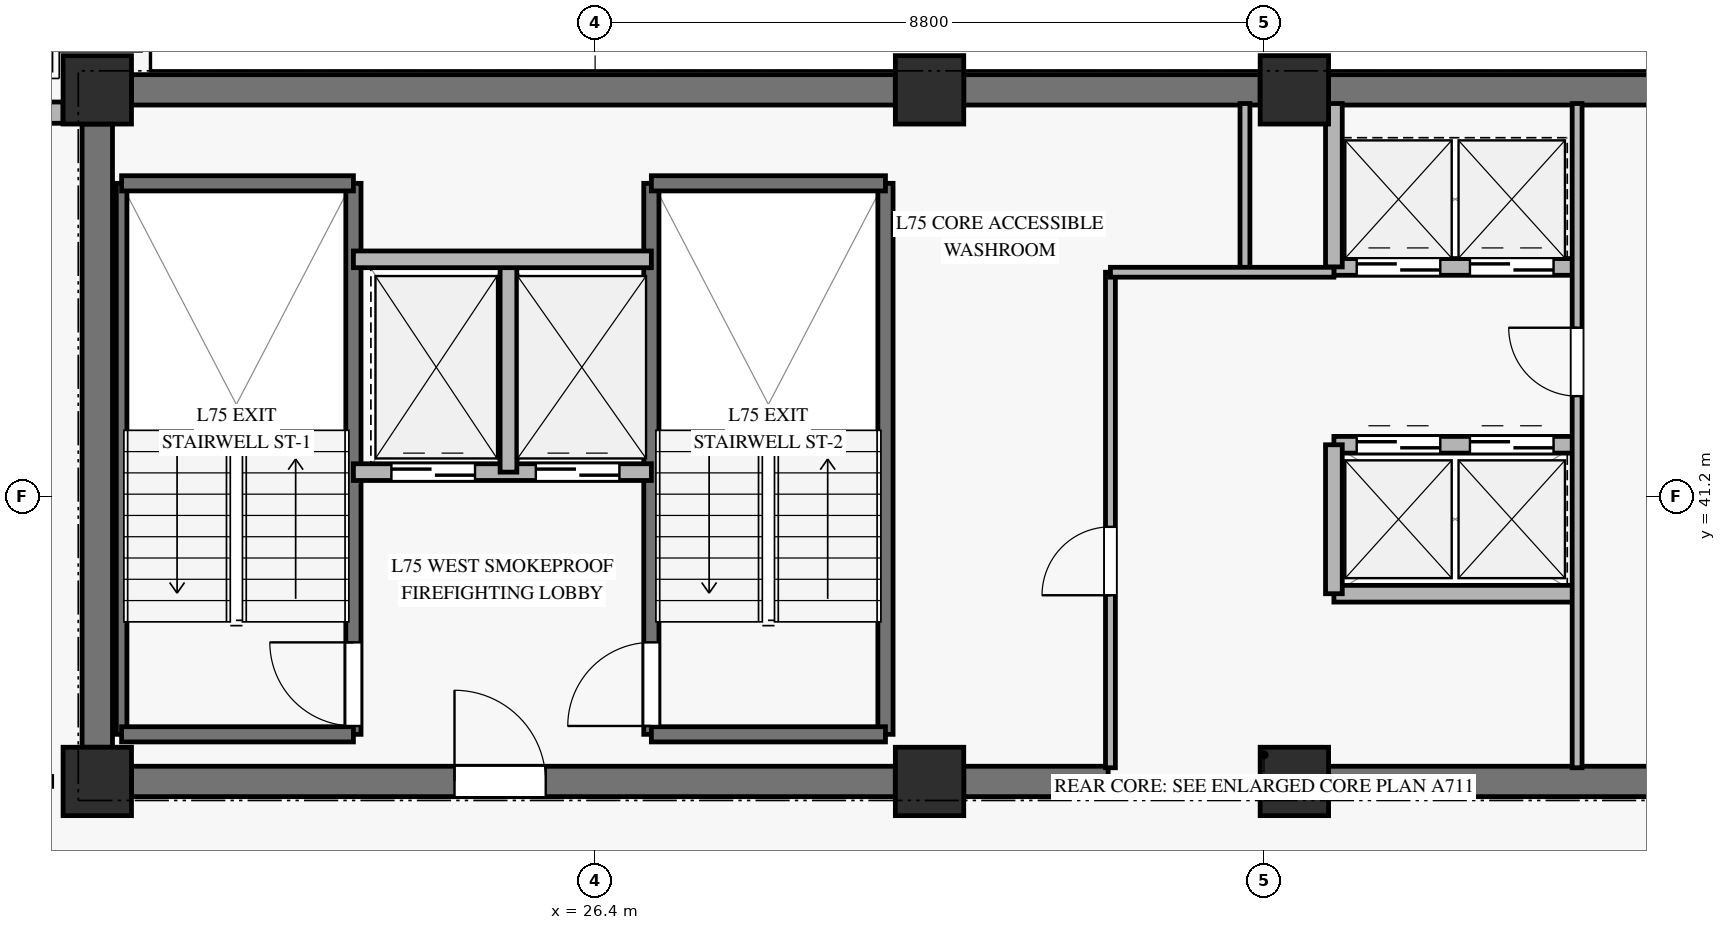
"""IFC4 building model, lengths in metres.
Left out: names, types, materials, properties, quantities, classifications, styles, units other than length and angle.
Written with IfcOpenShell. Run it as: python <this file> out.ifc"""

import sys

from ifc_helpers import new_model, si_unit, direction, frame, frame_2d, origin, origin_2d, place, context, subcontext, project, spatial, rectangle, extrude, source, transform, mapped, element, fill, save


model = new_model("IFC4")
c1 = context("Model", 3, precision=1e-05, world=origin(), true_north=direction((0.0, 1.0)))
c2 = subcontext(c1, "Body", "Model", "MODEL_VIEW")
j1 = project(units=[si_unit("LENGTHUNIT", "METRE"), si_unit("PLANEANGLEUNIT", "RADIAN")], contexts=[c1])
p1 = place(None, origin())
s1 = spatial("IfcSite", under=j1, at=p1, CompositionType="ELEMENT")
p2 = place(p1, origin())
s2 = spatial("IfcBuilding", under=s1, at=p2, CompositionType="ELEMENT")
p3 = place(p2, frame((0.0, 0.0, 293.8)))
s3 = spatial("IfcBuildingStorey", under=s2, at=p3, CompositionType="ELEMENT", Elevation=293.8)
m1 = source(origin(), c2, "Body", "SweptSolid", [
    extrude(rectangle(XDim=0.9, YDim=0.9, at=origin_2d()), origin(), (0.0, 0.0, 1.0), 3.185),
])
for number, where, z_axis, x_axis in (
    (1, (19.85, 37.45, 0.0), (0.0, 0.0, 1.0), (1.0, 0.0, 0.0)),
    (2, (19.85, 46.55, 0.0), (0.0, 0.0, 1.0), (1.0, 0.0, 0.0)),
    (3, (30.8, 37.45, 0.0), (0.0, 0.0, 1.0), (1.0, 0.0, 0.0)),
    (4, (30.8, 46.55, 0.0), (0.0, 0.0, 1.0), (1.0, 0.0, 0.0)),
    (5, (35.6, 37.45, 0.0), (0.0, 0.0, 1.0), (1.0, 0.0, 0.0)),
    (6, (35.6, 46.55, 0.0), (0.0, 0.0, 1.0), (1.0, 0.0, 0.0)),
):
    element("IfcColumn", number, at=place(p3, frame(where, z_axis=z_axis, x_axis=x_axis)), inside=s3, PredefinedType="PILASTER", context=c2, shape_type="MappedRepresentation", body=[
        mapped(m1, transform((0.0, 0.0, 0.0), x_axis=(1.0, 0.0, 0.0), y_axis=(0.0, 1.0, 0.0), z_axis=(0.0, 0.0, 1.0), scale=1.0)),
    ])
p4 = place(p3, frame((20.3, 46.55, 0.0), z_axis=(0.0, 0.0, 1.0), x_axis=(1.0, 0.0, 0.0)))
e7 = element("IfcWall", 7, at=p4, inside=s3, PredefinedType="SHEAR", context=c2, shape_type="SweptSolid", body=[
    extrude(rectangle(XDim=10.05, YDim=0.4, at=frame_2d((5.025, 0.0))), origin(), (0.0, 0.0, 1.0), 3.185),
])
p5 = place(p3, frame((31.25, 46.55, 0.0), z_axis=(0.0, 0.0, 1.0), x_axis=(1.0, 0.0, 0.0)))
e8 = element("IfcWall", 8, at=p5, inside=s3, PredefinedType="SHEAR", context=c2, shape_type="SweptSolid", body=[
    extrude(rectangle(XDim=3.9, YDim=0.4, at=frame_2d((1.95, 0.0))), origin(), (0.0, 0.0, 1.0), 3.185),
])
p6 = place(p3, frame((36.05, 46.55, 0.0), z_axis=(0.0, 0.0, 1.0), x_axis=(1.0, 0.0, 0.0)))
e9 = element("IfcWall", 9, at=p6, inside=s3, PredefinedType="SHEAR", context=c2, shape_type="SweptSolid", body=[
    extrude(rectangle(XDim=7.8, YDim=0.4, at=frame_2d((3.9, 0.0))), origin(), (0.0, 0.0, 1.0), 3.185),
])
p7 = place(p3, frame((20.3, 37.45, 0.0), z_axis=(0.0, 0.0, 1.0), x_axis=(1.0, 0.0, 0.0)))
e10 = element("IfcWall", 10, at=p7, inside=s3, PredefinedType="SHEAR", context=c2, shape_type="SweptSolid", body=[
    extrude(rectangle(XDim=10.05, YDim=0.4, at=frame_2d((5.025, 0.0))), origin(), (0.0, 0.0, 1.0), 3.185),
])
p8 = place(p7, frame((4.25, 0.0, 0.0)))
e11 = element("IfcOpeningElement", 11, at=p8, cuts=e10, PredefinedType="OPENING", context=c2, shape_type="SweptSolid", body=[
    extrude(rectangle(XDim=1.2, YDim=2.15, at=frame_2d((0.6, 1.075))), frame((0.0, 0.21, 0.0), z_axis=(0.0, -1.0, 0.0), x_axis=(1.0, 0.0, 0.0)), (0.0, 0.0, 1.0), 0.42),
])
p9 = place(p3, frame((31.25, 37.45, 0.0), z_axis=(0.0, 0.0, 1.0), x_axis=(1.0, 0.0, 0.0)))
e12 = element("IfcWall", 12, at=p9, inside=s3, PredefinedType="SHEAR", context=c2, shape_type="SweptSolid", body=[
    extrude(rectangle(XDim=1.9, YDim=0.4, at=frame_2d((0.95, 0.0))), origin(), (0.0, 0.0, 1.0), 3.185),
])
p10 = place(p3, frame((36.05, 37.45, 0.0), z_axis=(0.0, 0.0, 1.0), x_axis=(1.0, 0.0, 0.0)))
e13 = element("IfcWall", 13, at=p10, inside=s3, PredefinedType="SHEAR", context=c2, shape_type="SweptSolid", body=[
    extrude(rectangle(XDim=7.8, YDim=0.4, at=frame_2d((3.9, 0.0))), origin(), (0.0, 0.0, 1.0), 3.185),
])
p11 = place(p3, frame((19.85, 37.9, 0.0), z_axis=(0.0, 0.0, 1.0), x_axis=(0.0, 1.0, 0.0)))
e14 = element("IfcWall", 14, at=p11, inside=s3, PredefinedType="SHEAR", context=c2, shape_type="SweptSolid", body=[
    extrude(rectangle(XDim=8.2, YDim=0.4, at=frame_2d((4.1, 0.0))), origin(), (0.0, 0.0, 1.0), 3.185),
])
p12 = place(p3, frame((12.68, 46.25, 0.0), z_axis=(0.0, 0.0, 1.0), x_axis=(1.0, 0.0, 0.0)))
e15 = element("IfcWall", 15, at=p12, inside=s3, PredefinedType="SOLIDWALL", context=c2, shape_type="SweptSolid", body=[
    extrude(rectangle(XDim=6.72, YDim=0.28, at=frame_2d((3.36, 0.0))), origin(), (0.0, 0.0, 1.0), 2.815),
])
p13 = place(p12, frame((2.56, 0.0, 0.45)))
e16 = element("IfcOpeningElement", 16, at=p13, cuts=e15, PredefinedType="OPENING", context=c2, shape_type="SweptSolid", body=[
    extrude(rectangle(XDim=1.6, YDim=2.0, at=frame_2d((0.8, 1.0))), frame((0.0, 0.15, 0.0), z_axis=(0.0, -1.0, 0.0), x_axis=(1.0, 0.0, 0.0)), (0.0, 0.0, 1.0), 0.3),
])
p14 = place(p3, frame((20.17, 38.07, 0.0), z_axis=(0.0, 0.0, 1.0), x_axis=(0.0, 1.0, 0.0)))
e17 = element("IfcWall", 17, at=p14, inside=s3, PredefinedType="SOLIDWALL", context=c2, shape_type="SweptSolid", body=[
    extrude(rectangle(XDim=7.25, YDim=0.14, at=frame_2d((3.625, 0.0))), origin(), (0.0, 0.0, 1.0), 3.4),
])
p15 = place(p3, frame((23.22, 38.07, 0.0), z_axis=(0.0, 0.0, 1.0), x_axis=(0.0, 1.0, 0.0)))
e18 = element("IfcWall", 18, at=p15, inside=s3, PredefinedType="SOLIDWALL", context=c2, shape_type="SweptSolid", body=[
    extrude(rectangle(XDim=7.25, YDim=0.2, at=frame_2d((3.625, 0.0))), origin(), (0.0, 0.0, 1.0), 3.4),
])
p16 = place(p15, frame((0.11, 0.0, 0.0)))
e19 = element("IfcOpeningElement", 19, at=p16, cuts=e18, PredefinedType="OPENING", context=c2, shape_type="SweptSolid", body=[
    extrude(rectangle(XDim=1.1, YDim=2.15, at=frame_2d((0.55, 1.075))), frame((0.0, 0.11, 0.0), z_axis=(0.0, -1.0, 0.0), x_axis=(1.0, 0.0, 0.0)), (0.0, 0.0, 1.0), 0.22),
])
for number, where, z_axis, x_axis in (
    (20, (20.17, 45.32, 0.0), (0.0, 0.0, 1.0), (1.0, 0.0, 0.0)),
    (21, (20.17, 38.07, 0.0), (0.0, 0.0, 1.0), (1.0, 0.0, 0.0)),
):
    element("IfcWall", number, at=place(p3, frame(where, z_axis=z_axis, x_axis=x_axis)), inside=s3, PredefinedType="SOLIDWALL", context=c2, shape_type="SweptSolid", body=[
        extrude(rectangle(XDim=3.05, YDim=0.2, at=frame_2d((1.525, 0.0))), origin(), (0.0, 0.0, 1.0), 3.4),
    ])
p17 = place(p3, frame((27.14, 38.07, 0.0), z_axis=(0.0, 0.0, 1.0), x_axis=(0.0, 1.0, 0.0)))
e22 = element("IfcWall", 22, at=p17, inside=s3, PredefinedType="SOLIDWALL", context=c2, shape_type="SweptSolid", body=[
    extrude(rectangle(XDim=7.25, YDim=0.2, at=frame_2d((3.625, 0.0))), origin(), (0.0, 0.0, 1.0), 3.4),
])
p18 = place(p17, frame((0.11, 0.0, 0.0)))
e23 = element("IfcOpeningElement", 23, at=p18, cuts=e22, PredefinedType="OPENING", context=c2, shape_type="SweptSolid", body=[
    extrude(rectangle(XDim=1.1, YDim=2.15, at=frame_2d((0.55, 1.075))), frame((0.0, 0.11, 0.0), z_axis=(0.0, -1.0, 0.0), x_axis=(1.0, 0.0, 0.0)), (0.0, 0.0, 1.0), 0.22),
])
p19 = place(p3, frame((30.22, 38.07, 0.0), z_axis=(0.0, 0.0, 1.0), x_axis=(0.0, 1.0, 0.0)))
e24 = element("IfcWall", 24, at=p19, inside=s3, PredefinedType="SOLIDWALL", context=c2, shape_type="SweptSolid", body=[
    extrude(rectangle(XDim=7.25, YDim=0.2, at=frame_2d((3.625, 0.0))), origin(), (0.0, 0.0, 1.0), 3.4),
])
for number, where, z_axis, x_axis in (
    (25, (27.14, 45.32, 0.0), (0.0, 0.0, 1.0), (1.0, 0.0, 0.0)),
    (26, (27.14, 38.07, 0.0), (0.0, 0.0, 1.0), (1.0, 0.0, 0.0)),
):
    element("IfcWall", number, at=place(p3, frame(where, z_axis=z_axis, x_axis=x_axis)), inside=s3, PredefinedType="SOLIDWALL", context=c2, shape_type="SweptSolid", body=[
        extrude(rectangle(XDim=3.08, YDim=0.2, at=frame_2d((1.54, 0.0))), origin(), (0.0, 0.0, 1.0), 3.4),
    ])
p20 = place(p3, frame((23.22, 41.52, 0.0), z_axis=(0.0, 0.0, 1.0), x_axis=(1.0, 0.0, 0.0)))
e27 = element("IfcWall", 27, at=p20, inside=s3, PredefinedType="SOLIDWALL", context=c2, shape_type="SweptSolid", body=[
    extrude(rectangle(XDim=3.92, YDim=0.22, at=frame_2d((1.96, 0.0))), origin(), (0.0, 0.0, 1.0), 3.185),
])
p21 = place(p20, frame((0.5, 0.0, 0.0)))
e28 = element("IfcOpeningElement", 28, at=p21, cuts=e27, PredefinedType="OPENING", context=c2, shape_type="SweptSolid", body=[
    extrude(rectangle(XDim=1.1, YDim=2.2, at=frame_2d((0.55, 1.1))), frame((0.0, 0.12, 0.0), z_axis=(0.0, -1.0, 0.0), x_axis=(1.0, 0.0, 0.0)), (0.0, 0.0, 1.0), 0.24),
])
p22 = place(p20, frame((2.4, 0.0, 0.0)))
e29 = element("IfcOpeningElement", 29, at=p22, cuts=e27, PredefinedType="OPENING", context=c2, shape_type="SweptSolid", body=[
    extrude(rectangle(XDim=1.1, YDim=2.2, at=frame_2d((0.55, 1.1))), frame((0.0, 0.12, 0.0), z_axis=(0.0, -1.0, 0.0), x_axis=(1.0, 0.0, 0.0)), (0.0, 0.0, 1.0), 0.24),
])
p23 = place(p3, frame((25.26, 41.52, 0.0), z_axis=(0.0, 0.0, 1.0), x_axis=(0.0, 1.0, 0.0)))
e30 = element("IfcWall", 30, at=p23, inside=s3, PredefinedType="SOLIDWALL", context=c2, shape_type="SweptSolid", body=[
    extrude(rectangle(XDim=2.8, YDim=0.22, at=frame_2d((1.4, 0.0))), origin(), (0.0, 0.0, 1.0), 3.185),
])
p24 = place(p3, frame((23.22, 44.32, 0.0), z_axis=(0.0, 0.0, 1.0), x_axis=(1.0, 0.0, 0.0)))
e31 = element("IfcWall", 31, at=p24, inside=s3, PredefinedType="SOLIDWALL", context=c2, shape_type="SweptSolid", body=[
    extrude(rectangle(XDim=3.92, YDim=0.22, at=frame_2d((1.96, 0.0))), origin(), (0.0, 0.0, 1.0), 3.185),
])
p25 = place(p3, frame((36.12, 44.22, 0.0), z_axis=(0.0, 0.0, 1.0), x_axis=(1.0, 0.0, 0.0)))
e32 = element("IfcWall", 32, at=p25, inside=s3, PredefinedType="SOLIDWALL", context=c2, shape_type="SweptSolid", body=[
    extrude(rectangle(XDim=3.2, YDim=0.22, at=frame_2d((1.6, 0.0))), origin(), (0.0, 0.0, 1.0), 3.185),
])
p26 = place(p25, frame((0.3, 0.0, 0.0)))
e33 = element("IfcOpeningElement", 33, at=p26, cuts=e32, PredefinedType="OPENING", context=c2, shape_type="SweptSolid", body=[
    extrude(rectangle(XDim=1.1, YDim=2.2, at=frame_2d((0.55, 1.1))), frame((0.0, 0.12, 0.0), z_axis=(0.0, -1.0, 0.0), x_axis=(1.0, 0.0, 0.0)), (0.0, 0.0, 1.0), 0.24),
])
p27 = place(p25, frame((1.79, 0.0, 0.0)))
e34 = element("IfcOpeningElement", 34, at=p27, cuts=e32, PredefinedType="OPENING", context=c2, shape_type="SweptSolid", body=[
    extrude(rectangle(XDim=1.1, YDim=2.2, at=frame_2d((0.55, 1.1))), frame((0.0, 0.12, 0.0), z_axis=(0.0, -1.0, 0.0), x_axis=(1.0, 0.0, 0.0)), (0.0, 0.0, 1.0), 0.24),
])
p28 = place(p3, frame((36.12, 41.88, 0.0), z_axis=(0.0, 0.0, 1.0), x_axis=(1.0, 0.0, 0.0)))
e35 = element("IfcWall", 35, at=p28, inside=s3, PredefinedType="SOLIDWALL", context=c2, shape_type="SweptSolid", body=[
    extrude(rectangle(XDim=3.2, YDim=0.22, at=frame_2d((1.6, 0.0))), origin(), (0.0, 0.0, 1.0), 3.185),
])
p29 = place(p28, frame((0.3, 0.0, 0.0)))
e36 = element("IfcOpeningElement", 36, at=p29, cuts=e35, PredefinedType="OPENING", context=c2, shape_type="SweptSolid", body=[
    extrude(rectangle(XDim=1.1, YDim=2.2, at=frame_2d((0.55, 1.1))), frame((0.0, 0.12, 0.0), z_axis=(0.0, -1.0, 0.0), x_axis=(1.0, 0.0, 0.0)), (0.0, 0.0, 1.0), 0.24),
])
p30 = place(p28, frame((1.79, 0.0, 0.0)))
e37 = element("IfcOpeningElement", 37, at=p30, cuts=e35, PredefinedType="OPENING", context=c2, shape_type="SweptSolid", body=[
    extrude(rectangle(XDim=1.1, YDim=2.2, at=frame_2d((0.55, 1.1))), frame((0.0, 0.12, 0.0), z_axis=(0.0, -1.0, 0.0), x_axis=(1.0, 0.0, 0.0)), (0.0, 0.0, 1.0), 0.24),
])
p31 = place(p3, frame((36.12, 39.92, 0.0), z_axis=(0.0, 0.0, 1.0), x_axis=(1.0, 0.0, 0.0)))
e38 = element("IfcWall", 38, at=p31, inside=s3, PredefinedType="SOLIDWALL", context=c2, shape_type="SweptSolid", body=[
    extrude(rectangle(XDim=3.2, YDim=0.22, at=frame_2d((1.6, 0.0))), origin(), (0.0, 0.0, 1.0), 3.185),
])
p32 = place(p3, frame((36.12, 39.92, 0.0), z_axis=(0.0, 0.0, 1.0), x_axis=(0.0, 1.0, 0.0)))
e39 = element("IfcWall", 39, at=p32, inside=s3, PredefinedType="SOLIDWALL", context=c2, shape_type="SweptSolid", body=[
    extrude(rectangle(XDim=1.96, YDim=0.22, at=frame_2d((0.98, 0.0))), origin(), (0.0, 0.0, 1.0), 3.185),
])
p33 = place(p3, frame((36.12, 44.22, 0.0), z_axis=(0.0, 0.0, 1.0), x_axis=(0.0, 1.0, 0.0)))
e40 = element("IfcWall", 40, at=p33, inside=s3, PredefinedType="SOLIDWALL", context=c2, shape_type="SweptSolid", body=[
    extrude(rectangle(XDim=2.15, YDim=0.22, at=frame_2d((1.075, 0.0))), origin(), (0.0, 0.0, 1.0), 3.185),
])
p34 = place(p3, frame((33.18, 37.63, 0.0), z_axis=(0.0, 0.0, 1.0), x_axis=(0.0, 1.0, 0.0)))
e41 = element("IfcWall", 41, at=p34, inside=s3, PredefinedType="PARTITIONING", context=c2, shape_type="SweptSolid", body=[
    extrude(rectangle(XDim=6.52, YDim=0.13, at=frame_2d((3.26, 0.0))), origin(), (0.0, 0.0, 1.0), 2.27),
])
p35 = place(p34, frame((2.27, 0.0, 0.0)))
e42 = element("IfcOpeningElement", 42, at=p35, cuts=e41, PredefinedType="OPENING", context=c2, shape_type="SweptSolid", body=[
    extrude(rectangle(XDim=0.9, YDim=2.1, at=frame_2d((0.45, 1.05))), frame((0.0, 0.075, 0.0), z_axis=(0.0, -1.0, 0.0), x_axis=(1.0, 0.0, 0.0)), (0.0, 0.0, 1.0), 0.15),
])
p36 = place(p3, frame((34.95, 44.15, 0.0), z_axis=(0.0, 0.0, 1.0), x_axis=(0.0, 1.0, 0.0)))
e43 = element("IfcWall", 43, at=p36, inside=s3, PredefinedType="PARTITIONING", context=c2, shape_type="SweptSolid", body=[
    extrude(rectangle(XDim=2.22, YDim=0.13, at=frame_2d((1.11, 0.0))), origin(), (0.0, 0.0, 1.0), 3.185),
])
p37 = place(p3, frame((33.18, 44.15, 0.0), z_axis=(0.0, 0.0, 1.0), x_axis=(1.0, 0.0, 0.0)))
e44 = element("IfcWall", 44, at=p37, inside=s3, PredefinedType="PARTITIONING", context=c2, shape_type="SweptSolid", body=[
    extrude(rectangle(XDim=2.94, YDim=0.13, at=frame_2d((1.47, 0.0))), origin(), (0.0, 0.0, 1.0), 2.47),
])
p38 = place(p3, frame((39.32, 37.63, 0.0), z_axis=(0.0, 0.0, 1.0), x_axis=(0.0, 1.0, 0.0)))
e45 = element("IfcWall", 45, at=p38, inside=s3, PredefinedType="PARTITIONING", context=c2, shape_type="SweptSolid", body=[
    extrude(rectangle(XDim=8.74, YDim=0.13, at=frame_2d((4.37, 0.0))), origin(), (0.0, 0.0, 1.0), 3.185),
])
p39 = place(p38, frame((4.89, 0.0, 0.0)))
e46 = element("IfcOpeningElement", 46, at=p39, cuts=e45, PredefinedType="OPENING", context=c2, shape_type="SweptSolid", body=[
    extrude(rectangle(XDim=0.9, YDim=2.1, at=frame_2d((0.45, 1.05))), frame((0.0, 0.075, 0.0), z_axis=(0.0, -1.0, 0.0), x_axis=(1.0, 0.0, 0.0)), (0.0, 0.0, 1.0), 0.15),
])
m2 = source(origin(), c2, "Body", "SweptSolid", [
    extrude(rectangle(XDim=1.1, YDim=2.15, at=frame_2d((0.55, 1.075))), frame((0.0, 0.025, 0.0), z_axis=(0.0, -1.0, 0.0), x_axis=(1.0, 0.0, 0.0)), (0.0, 0.0, 1.0), 0.05),
])
p40 = place(p16, origin())
e47 = element("IfcDoor", 47, at=p40, inside=s3, OperationType="SINGLE_SWING_RIGHT", PredefinedType="DOOR", context=c2, shape_type="MappedRepresentation", body=[
    mapped(m2, transform((0.0, 0.0, 0.0), x_axis=(1.0, 0.0, 0.0), y_axis=(0.0, 1.0, 0.0), z_axis=(0.0, 0.0, 1.0), scale=1.0)),
])
fill(e19, e47)
p41 = place(p18, origin())
e48 = element("IfcDoor", 48, at=p41, inside=s3, OperationType="SINGLE_SWING_LEFT", PredefinedType="DOOR", context=c2, shape_type="MappedRepresentation", body=[
    mapped(m2, transform((0.0, 0.0, 0.0), x_axis=(1.0, 0.0, 0.0), y_axis=(0.0, 1.0, 0.0), z_axis=(0.0, 0.0, 1.0), scale=1.0)),
])
fill(e23, e48)
m3 = source(origin(), c2, "Body", "SweptSolid", [
    extrude(rectangle(XDim=1.1, YDim=2.2, at=frame_2d((0.55, 1.1))), frame((0.0, 0.025, 0.0), z_axis=(0.0, -1.0, 0.0), x_axis=(1.0, 0.0, 0.0)), (0.0, 0.0, 1.0), 0.05),
])
p42 = place(p21, origin())
e49 = element("IfcDoor", 49, at=p42, inside=s3, OperationType="SLIDING_TO_LEFT", PredefinedType="DOOR", context=c2, shape_type="MappedRepresentation", body=[
    mapped(m3, transform((0.0, 0.0, 0.0), x_axis=(1.0, 0.0, 0.0), y_axis=(0.0, 1.0, 0.0), z_axis=(0.0, 0.0, 1.0), scale=1.0)),
])
fill(e28, e49)
p43 = place(p22, origin())
e50 = element("IfcDoor", 50, at=p43, inside=s3, OperationType="SLIDING_TO_LEFT", PredefinedType="DOOR", context=c2, shape_type="MappedRepresentation", body=[
    mapped(m3, transform((0.0, 0.0, 0.0), x_axis=(1.0, 0.0, 0.0), y_axis=(0.0, 1.0, 0.0), z_axis=(0.0, 0.0, 1.0), scale=1.0)),
])
fill(e29, e50)
m4 = source(origin(), c2, "Body", "SweptSolid", [
    extrude(rectangle(XDim=1.2, YDim=2.15, at=frame_2d((0.6, 1.075))), frame((0.0, 0.025, 0.0), z_axis=(0.0, -1.0, 0.0), x_axis=(1.0, 0.0, 0.0)), (0.0, 0.0, 1.0), 0.05),
])
p44 = place(p8, origin())
e51 = element("IfcDoor", 51, at=p44, inside=s3, OperationType="SINGLE_SWING_LEFT", PredefinedType="DOOR", context=c2, shape_type="MappedRepresentation", body=[
    mapped(m4, transform((0.0, 0.0, 0.0), x_axis=(1.0, 0.0, 0.0), y_axis=(0.0, 1.0, 0.0), z_axis=(0.0, 0.0, 1.0), scale=1.0)),
])
fill(e11, e51)
p45 = place(p26, origin())
e52 = element("IfcDoor", 52, at=p45, inside=s3, OperationType="SLIDING_TO_LEFT", PredefinedType="DOOR", context=c2, shape_type="MappedRepresentation", body=[
    mapped(m3, transform((0.0, 0.0, 0.0), x_axis=(1.0, 0.0, 0.0), y_axis=(0.0, 1.0, 0.0), z_axis=(0.0, 0.0, 1.0), scale=1.0)),
])
fill(e33, e52)
p46 = place(p27, origin())
e53 = element("IfcDoor", 53, at=p46, inside=s3, OperationType="SLIDING_TO_LEFT", PredefinedType="DOOR", context=c2, shape_type="MappedRepresentation", body=[
    mapped(m3, transform((0.0, 0.0, 0.0), x_axis=(1.0, 0.0, 0.0), y_axis=(0.0, 1.0, 0.0), z_axis=(0.0, 0.0, 1.0), scale=1.0)),
])
fill(e34, e53)
p47 = place(p29, origin())
e54 = element("IfcDoor", 54, at=p47, inside=s3, OperationType="SLIDING_TO_LEFT", PredefinedType="DOOR", context=c2, shape_type="MappedRepresentation", body=[
    mapped(m3, transform((0.0, 0.0, 0.0), x_axis=(1.0, 0.0, 0.0), y_axis=(0.0, 1.0, 0.0), z_axis=(0.0, 0.0, 1.0), scale=1.0)),
])
fill(e36, e54)
p48 = place(p30, origin())
e55 = element("IfcDoor", 55, at=p48, inside=s3, OperationType="SLIDING_TO_LEFT", PredefinedType="DOOR", context=c2, shape_type="MappedRepresentation", body=[
    mapped(m3, transform((0.0, 0.0, 0.0), x_axis=(1.0, 0.0, 0.0), y_axis=(0.0, 1.0, 0.0), z_axis=(0.0, 0.0, 1.0), scale=1.0)),
])
fill(e37, e55)
m5 = source(origin(), c2, "Body", "SweptSolid", [
    extrude(rectangle(XDim=0.9, YDim=2.1, at=frame_2d((0.45, 1.05))), frame((0.0, 0.025, 0.0), z_axis=(0.0, -1.0, 0.0), x_axis=(1.0, 0.0, 0.0)), (0.0, 0.0, 1.0), 0.05),
])
p49 = place(p35, origin())
e56 = element("IfcDoor", 56, at=p49, inside=s3, OperationType="SINGLE_SWING_LEFT", PredefinedType="DOOR", context=c2, shape_type="MappedRepresentation", body=[
    mapped(m5, transform((0.0, 0.0, 0.0), x_axis=(1.0, 0.0, 0.0), y_axis=(0.0, 1.0, 0.0), z_axis=(0.0, 0.0, 1.0), scale=1.0)),
])
fill(e42, e56)
p50 = place(p39, origin())
e57 = element("IfcDoor", 57, at=p50, inside=s3, OperationType="SINGLE_SWING_RIGHT", PredefinedType="DOOR", context=c2, shape_type="MappedRepresentation", body=[
    mapped(m5, transform((0.0, 0.0, 0.0), x_axis=(1.0, 0.0, 0.0), y_axis=(0.0, 1.0, 0.0), z_axis=(0.0, 0.0, 1.0), scale=1.0)),
])
fill(e46, e57)
save(model, sys.argv[1])
